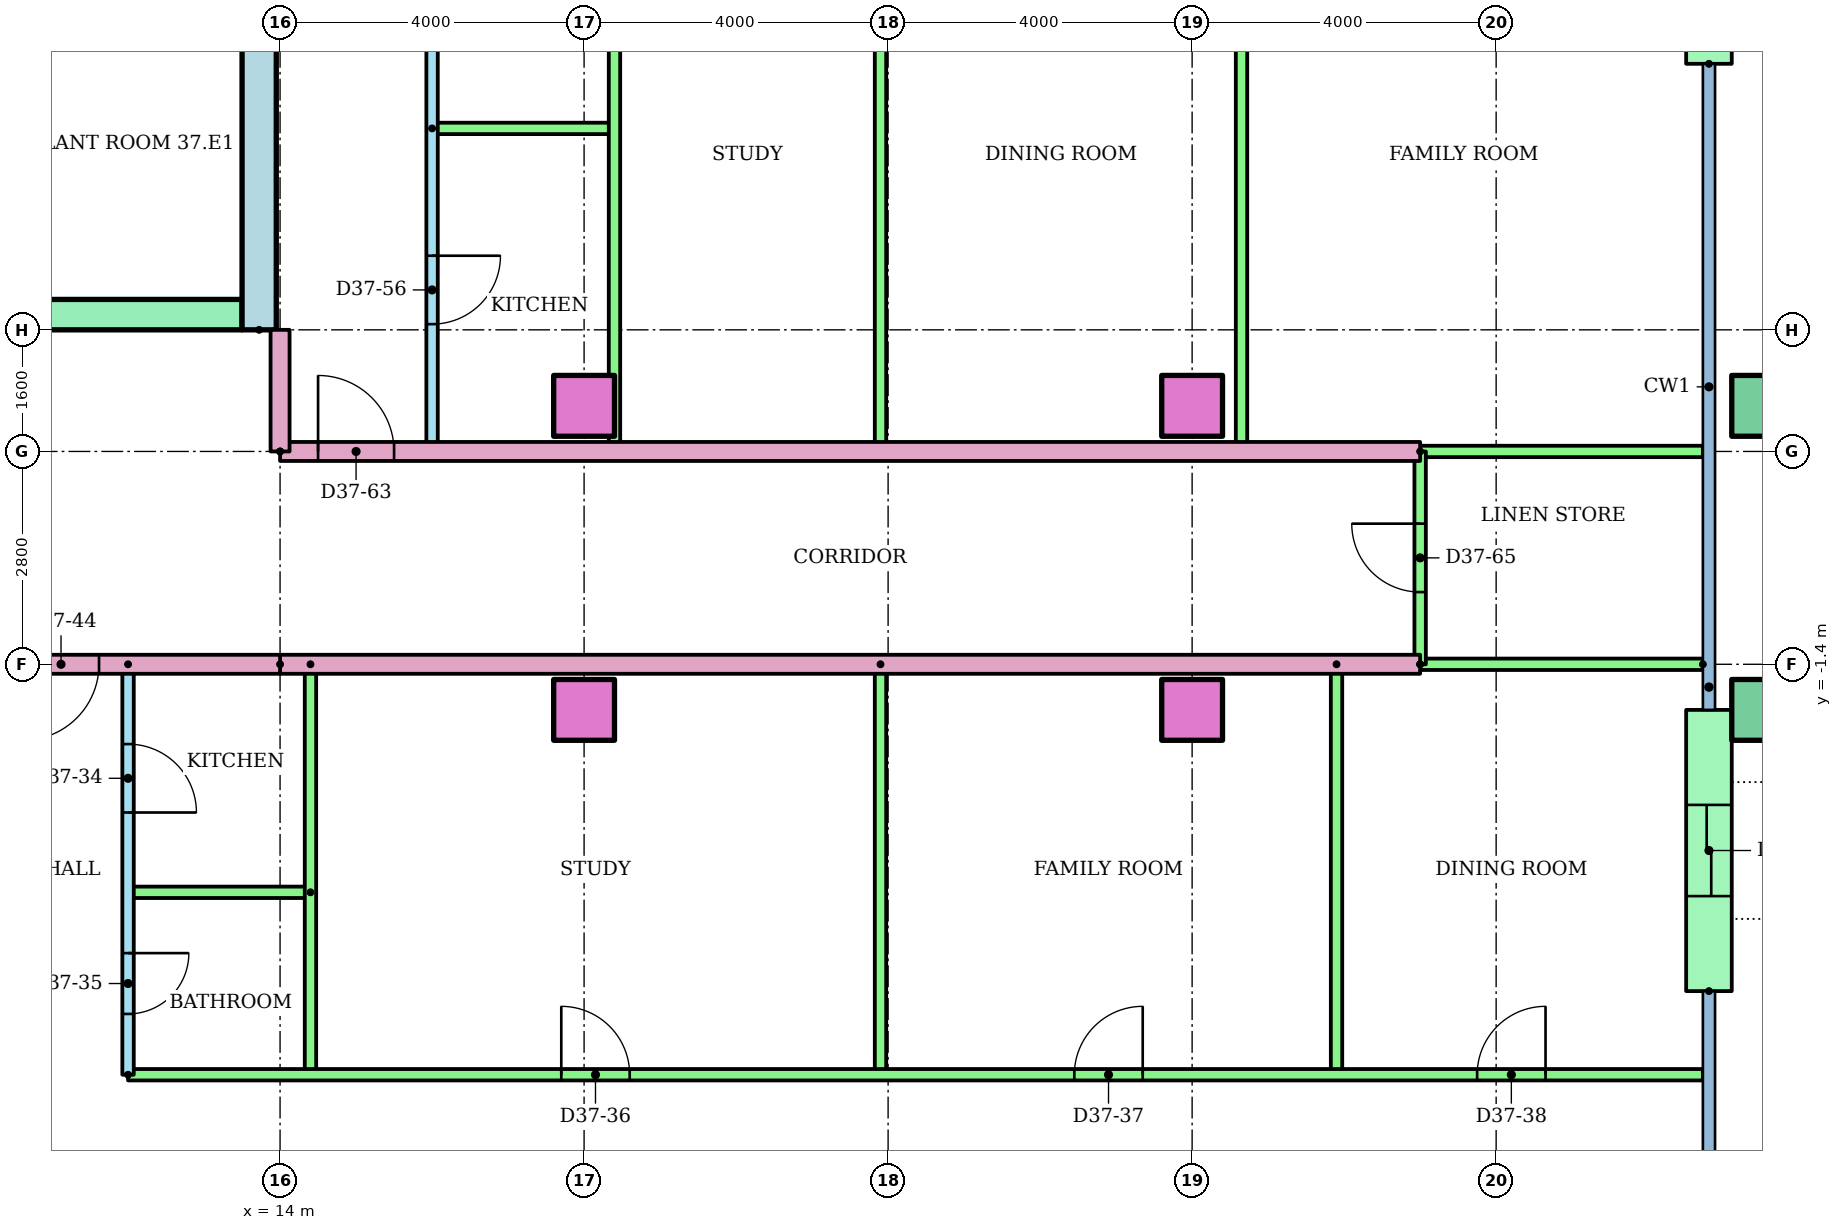
"""IFC4 building model, lengths in metres.
Left out: names, types, materials, properties, quantities, classifications, styles, units other than length and angle.
Written with IfcOpenShell. Run it as: python <this file> out.ifc"""

import sys

from ifc_helpers import new_model, si_unit, direction, frame, frame_2d, origin, origin_2d, place, context, subcontext, project, spatial, rectangle, hollow_rectangle, extrude, element, fill, save


model = new_model("IFC4")
c1 = context("Model", 3, precision=1e-05, world=origin(), true_north=direction((0.0, 1.0)))
c2 = subcontext(c1, "Body", "Model", "MODEL_VIEW")
j1 = project(units=[si_unit("LENGTHUNIT", "METRE"), si_unit("PLANEANGLEUNIT", "RADIAN")], contexts=[c1])
p1 = place(None, origin())
s1 = spatial("IfcSite", under=j1, at=p1, CompositionType="ELEMENT")
p2 = place(p1, origin())
s2 = spatial("IfcBuilding", under=s1, at=p2, CompositionType="ELEMENT")
p3 = place(p2, frame((0.0, 0.0, 142.2)))
s3 = spatial("IfcBuildingStorey", under=s2, at=p3, CompositionType="ELEMENT", Elevation=142.2)
for number, where in (
    (1, (18.0, -2.0, 0.0)),
    (2, (26.0, -2.0, 0.0)),
):
    element("IfcColumn", number, at=place(p3, frame(where)), inside=s3, PredefinedType="COLUMN", context=c2, shape_type="SweptSolid", body=[
        extrude(rectangle(XDim=0.8, YDim=0.8, at=origin_2d()), origin(), (0.0, 0.0, 1.0), 3.2),
    ])
p4 = place(p3, frame((33.5, -2.0, 0.0)))
e3 = element("IfcColumn", 3, at=p4, inside=s3, PredefinedType="COLUMN", context=c2, shape_type="SweptSolid", body=[
    extrude(hollow_rectangle(XDim=0.8, YDim=0.8, WallThickness=0.04, at=origin_2d()), origin(), (0.0, 0.0, 1.0), 3.2),
])
for number, where in (
    (4, (18.0, 2.0, 0.0)),
    (5, (26.0, 2.0, 0.0)),
):
    element("IfcColumn", number, at=place(p3, frame(where)), inside=s3, PredefinedType="COLUMN", context=c2, shape_type="SweptSolid", body=[
        extrude(rectangle(XDim=0.8, YDim=0.8, at=origin_2d()), origin(), (0.0, 0.0, 1.0), 3.2),
    ])
p5 = place(p3, frame((33.5, 2.0, 0.0)))
e6 = element("IfcColumn", 6, at=p5, inside=s3, PredefinedType="COLUMN", context=c2, shape_type="SweptSolid", body=[
    extrude(hollow_rectangle(XDim=0.8, YDim=0.8, WallThickness=0.04, at=origin_2d()), origin(), (0.0, 0.0, 1.0), 3.2),
])
p6 = place(p3, frame((32.8, -5.7, 0.0), z_axis=(0.0, 0.0, 1.0), x_axis=(0.0, 1.0, 0.0)))
e7 = element("IfcWall", 7, at=p6, inside=s3, PredefinedType="STANDARD", context=c2, shape_type="SweptSolid", body=[
    extrude(rectangle(XDim=3.7, YDim=0.6, at=frame_2d((1.85, 0.0))), origin(), (0.0, 0.0, 1.0), 2.92),
])
p7 = place(p6, frame((1.25, 0.0, 0.0)))
e8 = element("IfcOpeningElement", 8, at=p7, cuts=e7, PredefinedType="OPENING", context=c2, shape_type="SweptSolid", body=[
    extrude(rectangle(XDim=1.2, YDim=2.1, at=frame_2d((0.6, 1.05))), frame((0.0, 0.31, 0.0), z_axis=(0.0, -1.0, 0.0), x_axis=(1.0, 0.0, 0.0)), (0.0, 0.0, 1.0), 0.62),
])
p8 = place(p3, frame((32.8, 6.5, 0.0), z_axis=(0.0, 0.0, 1.0), x_axis=(0.0, 1.0, 0.0)))
e9 = element("IfcWall", 9, at=p8, inside=s3, PredefinedType="STANDARD", context=c2, shape_type="SweptSolid", body=[
    extrude(rectangle(XDim=4.5, YDim=0.6, at=frame_2d((2.25, 0.0))), origin(), (0.0, 0.0, 1.0), 2.92),
])
p9 = place(p8, frame((1.325, 0.0, 0.0)))
e10 = element("IfcOpeningElement", 10, at=p9, cuts=e9, PredefinedType="OPENING", context=c2, shape_type="SweptSolid", body=[
    extrude(rectangle(XDim=1.2, YDim=2.1, at=frame_2d((0.6, 1.05))), frame((0.0, 0.31, 0.0), z_axis=(0.0, -1.0, 0.0), x_axis=(1.0, 0.0, 0.0)), (0.0, 0.0, 1.0), 0.62),
])
p10 = place(p3, frame((13.725, 3.0, 0.0), z_axis=(0.0, 0.0, 1.0), x_axis=(0.0, 1.0, 0.0)))
e11 = element("IfcWall", 11, at=p10, inside=s3, PredefinedType="SHEAR", context=c2, shape_type="SweptSolid", body=[
    extrude(rectangle(XDim=17.0, YDim=0.45, at=frame_2d((8.5, 0.0))), origin(), (0.0, 0.0, 1.0), 2.92),
])
p11 = place(p3, frame((-13.5, 3.2, 0.0)))
e12 = element("IfcWall", 12, at=p11, inside=s3, PredefinedType="SHEAR", context=c2, shape_type="SweptSolid", body=[
    extrude(rectangle(XDim=27.0, YDim=0.4, at=frame_2d((13.5, 0.0))), origin(), (0.0, 0.0, 1.0), 2.92),
])
p12 = place(p11, frame((6.861, 0.0, 0.0)))
e13 = element("IfcOpeningElement", 13, at=p12, cuts=e12, PredefinedType="OPENING", context=c2, shape_type="SweptSolid", body=[
    extrude(rectangle(XDim=1.1, YDim=2.1, at=frame_2d((0.55, 1.05))), frame((0.0, 0.21, 0.0), z_axis=(0.0, -1.0, 0.0), x_axis=(1.0, 0.0, 0.0)), (0.0, 0.0, 1.0), 0.42),
])
p13 = place(p11, frame((9.906, 0.0, 0.0)))
e14 = element("IfcOpeningElement", 14, at=p13, cuts=e12, PredefinedType="OPENING", context=c2, shape_type="SweptSolid", body=[
    extrude(rectangle(XDim=1.1, YDim=2.1, at=frame_2d((0.55, 1.05))), frame((0.0, 0.21, 0.0), z_axis=(0.0, -1.0, 0.0), x_axis=(1.0, 0.0, 0.0)), (0.0, 0.0, 1.0), 0.42),
])
p14 = place(p11, frame((15.994, 0.0, 0.0)))
e15 = element("IfcOpeningElement", 15, at=p14, cuts=e12, PredefinedType="OPENING", context=c2, shape_type="SweptSolid", body=[
    extrude(rectangle(XDim=1.1, YDim=2.1, at=frame_2d((0.55, 1.05))), frame((0.0, 0.21, 0.0), z_axis=(0.0, -1.0, 0.0), x_axis=(1.0, 0.0, 0.0)), (0.0, 0.0, 1.0), 0.42),
])
p15 = place(p11, frame((19.039, 0.0, 0.0)))
e16 = element("IfcOpeningElement", 16, at=p15, cuts=e12, PredefinedType="OPENING", context=c2, shape_type="SweptSolid", body=[
    extrude(rectangle(XDim=1.1, YDim=2.1, at=frame_2d((0.55, 1.05))), frame((0.0, 0.21, 0.0), z_axis=(0.0, -1.0, 0.0), x_axis=(1.0, 0.0, 0.0)), (0.0, 0.0, 1.0), 0.42),
])
p16 = place(p11, frame((12.6, 0.0, 0.0)))
e17 = element("IfcOpeningElement", 17, at=p16, cuts=e12, PredefinedType="OPENING", context=c2, shape_type="SweptSolid", body=[
    extrude(rectangle(XDim=1.8, YDim=2.1, at=frame_2d((0.9, 1.05))), frame((0.0, 0.21, 0.0), z_axis=(0.0, -1.0, 0.0), x_axis=(1.0, 0.0, 0.0)), (0.0, 0.0, 1.0), 0.42),
])
p17 = place(p3, frame((12.0, -1.4, 0.0), z_axis=(0.0, 0.0, 1.0), x_axis=(0.0, -1.0, 0.0)))
e18 = element("IfcWall", 18, at=p17, inside=s3, PredefinedType="PARTITIONING", context=c2, shape_type="SweptSolid", body=[
    extrude(rectangle(XDim=5.4, YDim=0.15, at=frame_2d((2.7, 0.0))), origin(), (0.0, 0.0, 1.0), 2.4),
])
p18 = place(p17, frame((1.05, 0.0, 0.0)))
e19 = element("IfcOpeningElement", 19, at=p18, cuts=e18, PredefinedType="OPENING", context=c2, shape_type="SweptSolid", body=[
    extrude(rectangle(XDim=0.9, YDim=2.1, at=frame_2d((0.45, 1.05))), frame((0.0, 0.085, 0.0), z_axis=(0.0, -1.0, 0.0), x_axis=(1.0, 0.0, 0.0)), (0.0, 0.0, 1.0), 0.17),
])
p19 = place(p17, frame((3.8, 0.0, 0.0)))
e20 = element("IfcOpeningElement", 20, at=p19, cuts=e18, PredefinedType="OPENING", context=c2, shape_type="SweptSolid", body=[
    extrude(rectangle(XDim=0.8, YDim=2.1, at=frame_2d((0.4, 1.05))), frame((0.0, 0.085, 0.0), z_axis=(0.0, -1.0, 0.0), x_axis=(1.0, 0.0, 0.0)), (0.0, 0.0, 1.0), 0.17),
])
p20 = place(p3, frame((14.4, -4.4, 0.0), z_axis=(0.0, 0.0, 1.0), x_axis=(-1.0, 0.0, 0.0)))
e21 = element("IfcWall", 21, at=p20, inside=s3, PredefinedType="PARTITIONING", context=c2, shape_type="SweptSolid", body=[
    extrude(rectangle(XDim=2.4, YDim=0.15, at=frame_2d((1.2, 0.0))), origin(), (0.0, 0.0, 1.0), 2.4),
])
for number, where, z_axis, x_axis in (
    (22, (14.4, -1.4, 0.0), (0.0, 0.0, 1.0), (0.0, -1.0, 0.0)),
    (23, (21.9, -1.4, 0.0), (0.0, 0.0, 1.0), (0.0, -1.0, 0.0)),
    (24, (27.9, -1.4, 0.0), (0.0, 0.0, 1.0), (0.0, -1.0, 0.0)),
):
    element("IfcWall", number, at=place(p3, frame(where, z_axis=z_axis, x_axis=x_axis)), inside=s3, PredefinedType="PARTITIONING", context=c2, shape_type="SweptSolid", body=[
        extrude(rectangle(XDim=5.4, YDim=0.15, at=frame_2d((2.7, 0.0))), origin(), (0.0, 0.0, 1.0), 2.4),
    ])
p21 = place(p3, frame((12.0, -6.8, 0.0)))
e25 = element("IfcWall", 25, at=p21, inside=s3, PredefinedType="PARTITIONING", context=c2, shape_type="SweptSolid", body=[
    extrude(rectangle(XDim=20.72, YDim=0.15, at=frame_2d((10.36, 0.0))), origin(), (0.0, 0.0, 1.0), 2.4),
])
p22 = place(p21, frame((5.7, 0.0, 0.0)))
e26 = element("IfcOpeningElement", 26, at=p22, cuts=e25, PredefinedType="OPENING", context=c2, shape_type="SweptSolid", body=[
    extrude(rectangle(XDim=0.9, YDim=2.1, at=frame_2d((0.45, 1.05))), frame((0.0, 0.085, 0.0), z_axis=(0.0, -1.0, 0.0), x_axis=(1.0, 0.0, 0.0)), (0.0, 0.0, 1.0), 0.17),
])
p23 = place(p21, frame((12.45, 0.0, 0.0)))
e27 = element("IfcOpeningElement", 27, at=p23, cuts=e25, PredefinedType="OPENING", context=c2, shape_type="SweptSolid", body=[
    extrude(rectangle(XDim=0.9, YDim=2.1, at=frame_2d((0.45, 1.05))), frame((0.0, 0.085, 0.0), z_axis=(0.0, -1.0, 0.0), x_axis=(1.0, 0.0, 0.0)), (0.0, 0.0, 1.0), 0.17),
])
p24 = place(p21, frame((17.75, 0.0, 0.0)))
e28 = element("IfcOpeningElement", 28, at=p24, cuts=e25, PredefinedType="OPENING", context=c2, shape_type="SweptSolid", body=[
    extrude(rectangle(XDim=0.9, YDim=2.1, at=frame_2d((0.45, 1.05))), frame((0.0, 0.085, 0.0), z_axis=(0.0, -1.0, 0.0), x_axis=(1.0, 0.0, 0.0)), (0.0, 0.0, 1.0), 0.17),
])
p25 = place(p3, frame((29.0, -1.4, 0.0), z_axis=(0.0, 0.0, 1.0), x_axis=(-1.0, 0.0, 0.0)))
e29 = element("IfcWall", 29, at=p25, inside=s3, PredefinedType="PARTITIONING", context=c2, shape_type="SweptSolid", body=[
    extrude(rectangle(XDim=15.0, YDim=0.25, at=frame_2d((7.5, 0.0))), origin(), (0.0, 0.0, 1.0), 2.4),
])
p26 = place(p3, frame((32.72, -1.4, 0.0), z_axis=(0.0, 0.0, 1.0), x_axis=(-1.0, 0.0, 0.0)))
e30 = element("IfcWall", 30, at=p26, inside=s3, PredefinedType="PARTITIONING", context=c2, shape_type="SweptSolid", body=[
    extrude(rectangle(XDim=3.72, YDim=0.15, at=frame_2d((1.86, 0.0))), origin(), (0.0, 0.0, 1.0), 2.4),
])
p27 = place(p3, frame((16.0, 9.2, 0.0), z_axis=(0.0, 0.0, 1.0), x_axis=(0.0, -1.0, 0.0)))
e31 = element("IfcWall", 31, at=p27, inside=s3, PredefinedType="PARTITIONING", context=c2, shape_type="SweptSolid", body=[
    extrude(rectangle(XDim=7.8, YDim=0.15, at=frame_2d((3.9, 0.0))), origin(), (0.0, 0.0, 1.0), 2.4),
])
p28 = place(p27, frame((5.225, 0.0, 0.0)))
e32 = element("IfcOpeningElement", 32, at=p28, cuts=e31, PredefinedType="OPENING", context=c2, shape_type="SweptSolid", body=[
    extrude(rectangle(XDim=0.9, YDim=2.1, at=frame_2d((0.45, 1.05))), frame((0.0, 0.085, 0.0), z_axis=(0.0, -1.0, 0.0), x_axis=(1.0, 0.0, 0.0)), (0.0, 0.0, 1.0), 0.17),
])
p29 = place(p27, frame((1.375, 0.0, 0.0)))
e33 = element("IfcOpeningElement", 33, at=p29, cuts=e31, PredefinedType="OPENING", context=c2, shape_type="SweptSolid", body=[
    extrude(rectangle(XDim=0.8, YDim=2.1, at=frame_2d((0.4, 1.05))), frame((0.0, 0.085, 0.0), z_axis=(0.0, -1.0, 0.0), x_axis=(1.0, 0.0, 0.0)), (0.0, 0.0, 1.0), 0.17),
])
p30 = place(p3, frame((16.0, 5.65, 0.0)))
e34 = element("IfcWall", 34, at=p30, inside=s3, PredefinedType="PARTITIONING", context=c2, shape_type="SweptSolid", body=[
    extrude(rectangle(XDim=2.4, YDim=0.15, at=frame_2d((1.2, 0.0))), origin(), (0.0, 0.0, 1.0), 2.4),
])
for number, where, z_axis, x_axis in (
    (35, (18.4, 9.2, 0.0), (0.0, 0.0, 1.0), (0.0, -1.0, 0.0)),
    (36, (21.9, 9.2, 0.0), (0.0, 0.0, 1.0), (0.0, -1.0, 0.0)),
    (37, (26.65, 9.2, 0.0), (0.0, 0.0, 1.0), (0.0, -1.0, 0.0)),
):
    element("IfcWall", number, at=place(p3, frame(where, z_axis=z_axis, x_axis=x_axis)), inside=s3, PredefinedType="PARTITIONING", context=c2, shape_type="SweptSolid", body=[
        extrude(rectangle(XDim=7.8, YDim=0.15, at=frame_2d((3.9, 0.0))), origin(), (0.0, 0.0, 1.0), 2.4),
    ])
p31 = place(p3, frame((14.0, 1.4, 0.0)))
e38 = element("IfcWall", 38, at=p31, inside=s3, PredefinedType="PARTITIONING", context=c2, shape_type="SweptSolid", body=[
    extrude(rectangle(XDim=15.0, YDim=0.25, at=frame_2d((7.5, 0.0))), origin(), (0.0, 0.0, 1.0), 2.4),
])
p32 = place(p31, frame((0.5, 0.0, 0.0)))
e39 = element("IfcOpeningElement", 39, at=p32, cuts=e38, PredefinedType="OPENING", context=c2, shape_type="SweptSolid", body=[
    extrude(rectangle(XDim=1.0, YDim=2.1, at=frame_2d((0.5, 1.05))), frame((0.0, 0.135, 0.0), z_axis=(0.0, -1.0, 0.0), x_axis=(1.0, 0.0, 0.0)), (0.0, 0.0, 1.0), 0.27),
])
p33 = place(p3, frame((29.0, 1.4, 0.0)))
e40 = element("IfcWall", 40, at=p33, inside=s3, PredefinedType="PARTITIONING", context=c2, shape_type="SweptSolid", body=[
    extrude(rectangle(XDim=3.72, YDim=0.15, at=frame_2d((1.86, 0.0))), origin(), (0.0, 0.0, 1.0), 2.4),
])
p34 = place(p3, frame((29.0, -1.4, 0.0), z_axis=(0.0, 0.0, 1.0), x_axis=(0.0, 1.0, 0.0)))
e41 = element("IfcWall", 41, at=p34, inside=s3, PredefinedType="PARTITIONING", context=c2, shape_type="SweptSolid", body=[
    extrude(rectangle(XDim=2.8, YDim=0.15, at=frame_2d((1.4, 0.0))), origin(), (0.0, 0.0, 1.0), 2.4),
])
p35 = place(p34, frame((0.95, 0.0, 0.0)))
e42 = element("IfcOpeningElement", 42, at=p35, cuts=e41, PredefinedType="OPENING", context=c2, shape_type="SweptSolid", body=[
    extrude(rectangle(XDim=0.9, YDim=2.1, at=frame_2d((0.45, 1.05))), frame((0.0, 0.085, 0.0), z_axis=(0.0, -1.0, 0.0), x_axis=(1.0, 0.0, 0.0)), (0.0, 0.0, 1.0), 0.17),
])
p36 = place(p3, frame((14.0, -1.4, 0.0), z_axis=(0.0, 0.0, 1.0), x_axis=(-1.0, 0.0, 0.0)))
e43 = element("IfcWall", 43, at=p36, inside=s3, PredefinedType="PARTITIONING", context=c2, shape_type="SweptSolid", body=[
    extrude(rectangle(XDim=28.0, YDim=0.25, at=frame_2d((14.0, 0.0))), origin(), (0.0, 0.0, 1.0), 2.4),
])
p37 = place(p36, frame((4.618, 0.0, 0.0)))
e44 = element("IfcOpeningElement", 44, at=p37, cuts=e43, PredefinedType="OPENING", context=c2, shape_type="SweptSolid", body=[
    extrude(rectangle(XDim=1.0, YDim=2.1, at=frame_2d((0.5, 1.05))), frame((0.0, 0.135, 0.0), z_axis=(0.0, -1.0, 0.0), x_axis=(1.0, 0.0, 0.0)), (0.0, 0.0, 1.0), 0.27),
])
p38 = place(p36, frame((2.382, 0.0, 0.0)))
e45 = element("IfcOpeningElement", 45, at=p38, cuts=e43, PredefinedType="OPENING", context=c2, shape_type="SweptSolid", body=[
    extrude(rectangle(XDim=1.0, YDim=2.1, at=frame_2d((0.5, 1.05))), frame((0.0, 0.135, 0.0), z_axis=(0.0, -1.0, 0.0), x_axis=(1.0, 0.0, 0.0)), (0.0, 0.0, 1.0), 0.27),
])
p39 = place(p3, frame((14.0, 1.4, 0.0), z_axis=(0.0, 0.0, 1.0), x_axis=(0.0, 1.0, 0.0)))
e46 = element("IfcWall", 46, at=p39, inside=s3, PredefinedType="PARTITIONING", context=c2, shape_type="SweptSolid", body=[
    extrude(rectangle(XDim=1.6, YDim=0.25, at=frame_2d((0.8, 0.0))), origin(), (0.0, 0.0, 1.0), 2.4),
])
p40 = place(p18, origin())
e47 = element("IfcDoor", 47, at=p40, inside=s3, OperationType="SINGLE_SWING_RIGHT", PredefinedType="DOOR", context=c2, shape_type="SweptSolid", body=[
    extrude(rectangle(XDim=0.9, YDim=2.1, at=frame_2d((0.45, 1.05))), frame((0.0, 0.025, 0.0), z_axis=(0.0, -1.0, 0.0), x_axis=(1.0, 0.0, 0.0)), (0.0, 0.0, 1.0), 0.05),
])
fill(e19, e47)
p41 = place(p19, origin())
e48 = element("IfcDoor", 48, at=p41, inside=s3, OperationType="SINGLE_SWING_LEFT", PredefinedType="DOOR", context=c2, shape_type="SweptSolid", body=[
    extrude(rectangle(XDim=0.8, YDim=2.1, at=frame_2d((0.4, 1.05))), frame((0.0, 0.025, 0.0), z_axis=(0.0, -1.0, 0.0), x_axis=(1.0, 0.0, 0.0)), (0.0, 0.0, 1.0), 0.05),
])
fill(e20, e48)
p42 = place(p22, origin())
e49 = element("IfcDoor", 49, at=p42, inside=s3, OperationType="SINGLE_SWING_LEFT", PredefinedType="DOOR", context=c2, shape_type="SweptSolid", body=[
    extrude(rectangle(XDim=0.9, YDim=2.1, at=frame_2d((0.45, 1.05))), frame((0.0, 0.025, 0.0), z_axis=(0.0, -1.0, 0.0), x_axis=(1.0, 0.0, 0.0)), (0.0, 0.0, 1.0), 0.05),
])
fill(e26, e49)
p43 = place(p23, origin())
e50 = element("IfcDoor", 50, at=p43, inside=s3, OperationType="SINGLE_SWING_RIGHT", PredefinedType="DOOR", context=c2, shape_type="SweptSolid", body=[
    extrude(rectangle(XDim=0.9, YDim=2.1, at=frame_2d((0.45, 1.05))), frame((0.0, 0.025, 0.0), z_axis=(0.0, -1.0, 0.0), x_axis=(1.0, 0.0, 0.0)), (0.0, 0.0, 1.0), 0.05),
])
fill(e27, e50)
p44 = place(p24, origin())
e51 = element("IfcDoor", 51, at=p44, inside=s3, OperationType="SINGLE_SWING_RIGHT", PredefinedType="DOOR", context=c2, shape_type="SweptSolid", body=[
    extrude(rectangle(XDim=0.9, YDim=2.1, at=frame_2d((0.45, 1.05))), frame((0.0, 0.025, 0.0), z_axis=(0.0, -1.0, 0.0), x_axis=(1.0, 0.0, 0.0)), (0.0, 0.0, 1.0), 0.05),
])
fill(e28, e51)
p45 = place(p38, origin())
e52 = element("IfcDoor", 52, at=p45, inside=s3, OperationType="SINGLE_SWING_RIGHT", PredefinedType="DOOR", context=c2, shape_type="SweptSolid", body=[
    extrude(rectangle(XDim=1.0, YDim=2.1, at=frame_2d((0.5, 1.05))), frame((0.0, 0.025, 0.0), z_axis=(0.0, -1.0, 0.0), x_axis=(1.0, 0.0, 0.0)), (0.0, 0.0, 1.0), 0.05),
])
fill(e45, e52)
p46 = place(p28, origin())
e53 = element("IfcDoor", 53, at=p46, inside=s3, OperationType="SINGLE_SWING_LEFT", PredefinedType="DOOR", context=c2, shape_type="SweptSolid", body=[
    extrude(rectangle(XDim=0.9, YDim=2.1, at=frame_2d((0.45, 1.05))), frame((0.0, 0.025, 0.0), z_axis=(0.0, -1.0, 0.0), x_axis=(1.0, 0.0, 0.0)), (0.0, 0.0, 1.0), 0.05),
])
fill(e32, e53)
p47 = place(p32, origin())
e54 = element("IfcDoor", 54, at=p47, inside=s3, OperationType="SINGLE_SWING_LEFT", PredefinedType="DOOR", context=c2, shape_type="SweptSolid", body=[
    extrude(rectangle(XDim=1.0, YDim=2.1, at=frame_2d((0.5, 1.05))), frame((0.0, 0.025, 0.0), z_axis=(0.0, -1.0, 0.0), x_axis=(1.0, 0.0, 0.0)), (0.0, 0.0, 1.0), 0.05),
])
fill(e39, e54)
p48 = place(p35, origin())
e55 = element("IfcDoor", 55, at=p48, inside=s3, OperationType="SINGLE_SWING_RIGHT", PredefinedType="DOOR", context=c2, shape_type="SweptSolid", body=[
    extrude(rectangle(XDim=0.9, YDim=2.1, at=frame_2d((0.45, 1.05))), frame((0.0, 0.025, 0.0), z_axis=(0.0, -1.0, 0.0), x_axis=(1.0, 0.0, 0.0)), (0.0, 0.0, 1.0), 0.05),
])
fill(e42, e55)
p49 = place(p7, origin())
e56 = element("IfcDoor", 56, at=p49, inside=s3, OperationType="SLIDING_TO_LEFT", PredefinedType="DOOR", context=c2, shape_type="SweptSolid", body=[
    extrude(rectangle(XDim=1.2, YDim=2.1, at=frame_2d((0.6, 1.05))), frame((0.0, 0.025, 0.0), z_axis=(0.0, -1.0, 0.0), x_axis=(1.0, 0.0, 0.0)), (0.0, 0.0, 1.0), 0.05),
])
fill(e8, e56)
save(model, sys.argv[1])
